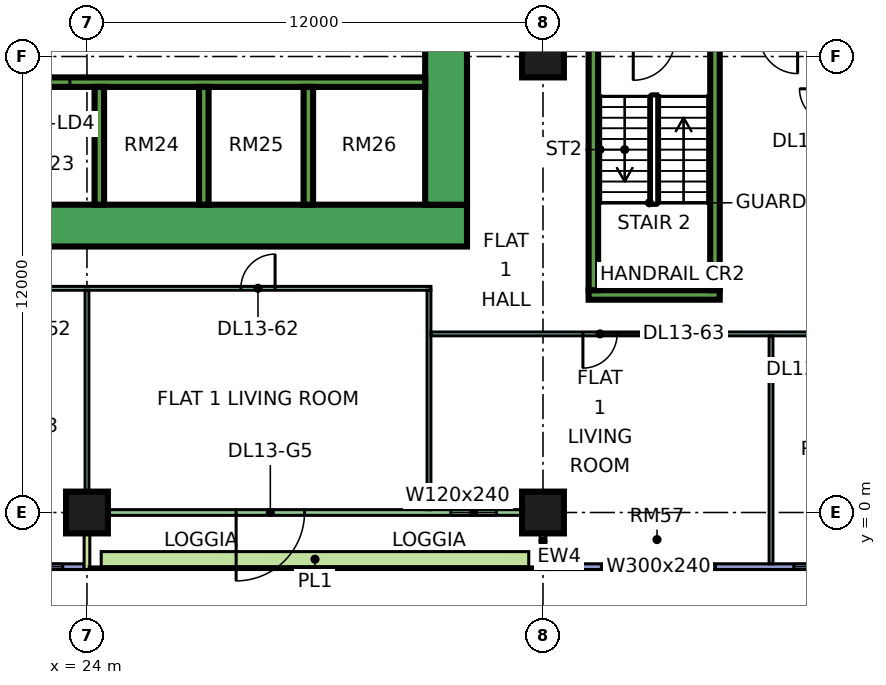
"""IFC4 building model, lengths in metres.
Left out: names, types, materials, properties, quantities, classifications, styles, units other than length and angle.
Written with IfcOpenShell. Run it as: python <this file> out.ifc"""

import sys

from ifc_helpers import new_model, si_unit, direction, frame, frame_2d, origin, origin_2d, place, context, subcontext, project, spatial, rectangle, extrude, element, fill, save


model = new_model("IFC4")
c1 = context("Model", 3, precision=1e-05, world=origin(), true_north=direction((0.0, 1.0)))
c2 = subcontext(c1, "Body", "Model", "MODEL_VIEW")
j1 = project(units=[si_unit("LENGTHUNIT", "METRE"), si_unit("PLANEANGLEUNIT", "RADIAN")], contexts=[c1])
p1 = place(None, origin())
s1 = spatial("IfcSite", under=j1, at=p1, CompositionType="ELEMENT")
p2 = place(p1, origin())
s2 = spatial("IfcBuilding", under=s1, at=p2, CompositionType="ELEMENT")
p3 = place(p2, frame((0.0, 0.0, 63.9)))
s3 = spatial("IfcBuildingStorey", under=s2, at=p3, CompositionType="ELEMENT", Elevation=63.9)
for number, where, z_axis, x_axis in (
    (1, (24.0, 0.0, 0.0), (0.0, 0.0, 1.0), (1.0, 0.0, 0.0)),
    (2, (36.0, 0.0, 0.0), (0.0, 0.0, 1.0), (1.0, 0.0, 0.0)),
    (3, (36.0, 12.0, 0.0), (0.0, 0.0, 1.0), (1.0, 0.0, 0.0)),
):
    element("IfcColumn", number, at=place(p3, frame(where, z_axis=z_axis, x_axis=x_axis)), inside=s3, PredefinedType="COLUMN", context=c2, shape_type="SweptSolid", body=[
        extrude(rectangle(XDim=1.1, YDim=1.1, at=origin_2d()), origin(), (0.0, 0.0, 1.0), 3.75),
    ])
p4 = place(p3, frame((9.0, 7.55, 0.0), z_axis=(0.0, 0.0, 1.0), x_axis=(1.0, 0.0, 0.0)))
e4 = element("IfcWall", 4, at=p4, inside=s3, PredefinedType="SHEAR", context=c2, shape_type="SweptSolid", body=[
    extrude(rectangle(XDim=25.0, YDim=1.1, at=frame_2d((12.5, 0.0))), origin(), (0.0, 0.0, 1.0), 3.75),
])
p5 = place(p3, frame((33.45, 8.1, 0.0), z_axis=(0.0, 0.0, 1.0), x_axis=(0.0, 1.0, 0.0)))
e5 = element("IfcWall", 5, at=p5, inside=s3, PredefinedType="SHEAR", context=c2, shape_type="SweptSolid", body=[
    extrude(rectangle(XDim=10.8, YDim=1.1, at=frame_2d((5.4, 0.0))), origin(), (0.0, 0.0, 1.0), 3.75),
])
p6 = place(p5, frame((5.1, 0.0, 0.0)))
e6 = element("IfcOpeningElement", 6, at=p6, cuts=e5, PredefinedType="OPENING", context=c2, shape_type="SweptSolid", body=[
    extrude(rectangle(XDim=1.8, YDim=2.4, at=frame_2d((0.9, 1.2))), frame((0.0, 0.56, 0.0), z_axis=(0.0, -1.0, 0.0), x_axis=(1.0, 0.0, 0.0)), (0.0, 0.0, 1.0), 1.12),
])
p7 = place(p3, frame((13.45, 11.325, 0.0), z_axis=(0.0, 0.0, 1.0), x_axis=(1.0, 0.0, 0.0)))
e7 = element("IfcWall", 7, at=p7, inside=s3, PredefinedType="SHEAR", context=c2, shape_type="SweptSolid", body=[
    extrude(rectangle(XDim=19.45, YDim=0.25, at=frame_2d((9.725, 0.0))), origin(), (0.0, 0.0, 1.0), 3.75),
])
p8 = place(p7, frame((0.65, 0.0, 0.0)))
e8 = element("IfcOpeningElement", 8, at=p8, cuts=e7, PredefinedType="OPENING", context=c2, shape_type="SweptSolid", body=[
    extrude(rectangle(XDim=1.2, YDim=2.2, at=frame_2d((0.6, 1.1))), frame((0.0, 0.135, 0.0), z_axis=(0.0, -1.0, 0.0), x_axis=(1.0, 0.0, 0.0)), (0.0, 0.0, 1.0), 0.27),
])
p9 = place(p7, frame((3.4, 0.0, 0.0)))
e9 = element("IfcOpeningElement", 9, at=p9, cuts=e7, PredefinedType="OPENING", context=c2, shape_type="SweptSolid", body=[
    extrude(rectangle(XDim=1.2, YDim=2.2, at=frame_2d((0.6, 1.1))), frame((0.0, 0.135, 0.0), z_axis=(0.0, -1.0, 0.0), x_axis=(1.0, 0.0, 0.0)), (0.0, 0.0, 1.0), 0.27),
])
p10 = place(p7, frame((6.15, 0.0, 0.0)))
e10 = element("IfcOpeningElement", 10, at=p10, cuts=e7, PredefinedType="OPENING", context=c2, shape_type="SweptSolid", body=[
    extrude(rectangle(XDim=1.2, YDim=2.2, at=frame_2d((0.6, 1.1))), frame((0.0, 0.135, 0.0), z_axis=(0.0, -1.0, 0.0), x_axis=(1.0, 0.0, 0.0)), (0.0, 0.0, 1.0), 0.27),
])
p11 = place(p7, frame((8.9, 0.0, 0.0)))
e11 = element("IfcOpeningElement", 11, at=p11, cuts=e7, PredefinedType="OPENING", context=c2, shape_type="SweptSolid", body=[
    extrude(rectangle(XDim=1.2, YDim=2.2, at=frame_2d((0.6, 1.1))), frame((0.0, 0.135, 0.0), z_axis=(0.0, -1.0, 0.0), x_axis=(1.0, 0.0, 0.0)), (0.0, 0.0, 1.0), 0.27),
])
for number, where, z_axis, x_axis in (
    (12, (24.325, 8.1, 0.0), (0.0, 0.0, 1.0), (0.0, 1.0, 0.0)),
    (13, (27.075, 8.1, 0.0), (0.0, 0.0, 1.0), (0.0, 1.0, 0.0)),
    (14, (29.825, 8.1, 0.0), (0.0, 0.0, 1.0), (0.0, 1.0, 0.0)),
):
    element("IfcWall", number, at=place(p3, frame(where, z_axis=z_axis, x_axis=x_axis)), inside=s3, PredefinedType="SHEAR", context=c2, shape_type="SweptSolid", body=[
        extrude(rectangle(XDim=3.1, YDim=0.25, at=frame_2d((1.55, 0.0))), origin(), (0.0, 0.0, 1.0), 3.75),
    ])
p12 = place(p3, frame((37.2, 5.725, 0.0), z_axis=(0.0, 0.0, 1.0), x_axis=(1.0, 0.0, 0.0)))
e15 = element("IfcWall", 15, at=p12, inside=s3, PredefinedType="SHEAR", context=c2, shape_type="SweptSolid", body=[
    extrude(rectangle(XDim=3.45, YDim=0.25, at=frame_2d((1.725, 0.0))), origin(), (0.0, 0.0, 1.0), 3.75),
])
for number, where, z_axis, x_axis in (
    (16, (37.325, 5.85, 0.0), (0.0, 0.0, 1.0), (0.0, 1.0, 0.0)),
    (17, (40.525, 5.85, 0.0), (0.0, 0.0, 1.0), (0.0, 1.0, 0.0)),
):
    element("IfcWall", number, at=place(p3, frame(where, z_axis=z_axis, x_axis=x_axis)), inside=s3, PredefinedType="SHEAR", context=c2, shape_type="SweptSolid", body=[
        extrude(rectangle(XDim=6.5, YDim=0.25, at=frame_2d((3.25, 0.0))), origin(), (0.0, 0.0, 1.0), 3.75),
    ])
p13 = place(p3, frame((12.5, -1.425, 0.0), z_axis=(0.0, 0.0, 1.0), x_axis=(1.0, 0.0, 0.0)))
e18 = element("IfcWall", 18, at=p13, inside=s3, PredefinedType="SOLIDWALL", context=c2, shape_type="SweptSolid", body=[
    extrude(rectangle(XDim=11.425, YDim=0.15, at=frame_2d((5.712, 0.0))), origin(), (0.0, 0.0, 1.0), 3.35),
])
p14 = place(p13, frame((0.35, 0.0, 0.45)))
e19 = element("IfcOpeningElement", 19, at=p14, cuts=e18, PredefinedType="OPENING", context=c2, shape_type="SweptSolid", body=[
    extrude(rectangle(XDim=1.8, YDim=2.4, at=frame_2d((0.9, 1.2))), frame((0.0, 0.085, 0.0), z_axis=(0.0, -1.0, 0.0), x_axis=(1.0, 0.0, 0.0)), (0.0, 0.0, 1.0), 0.17),
])
p15 = place(p13, frame((3.1, 0.0, 0.45)))
e20 = element("IfcOpeningElement", 20, at=p15, cuts=e18, PredefinedType="OPENING", context=c2, shape_type="SweptSolid", body=[
    extrude(rectangle(XDim=1.8, YDim=2.4, at=frame_2d((0.9, 1.2))), frame((0.0, 0.085, 0.0), z_axis=(0.0, -1.0, 0.0), x_axis=(1.0, 0.0, 0.0)), (0.0, 0.0, 1.0), 0.17),
])
p16 = place(p13, frame((6.1, 0.0, 0.45)))
e21 = element("IfcOpeningElement", 21, at=p16, cuts=e18, PredefinedType="OPENING", context=c2, shape_type="SweptSolid", body=[
    extrude(rectangle(XDim=1.8, YDim=2.4, at=frame_2d((0.9, 1.2))), frame((0.0, 0.085, 0.0), z_axis=(0.0, -1.0, 0.0), x_axis=(1.0, 0.0, 0.0)), (0.0, 0.0, 1.0), 0.17),
])
p17 = place(p13, frame((9.062, 0.0, 0.45)))
e22 = element("IfcOpeningElement", 22, at=p17, cuts=e18, PredefinedType="OPENING", context=c2, shape_type="SweptSolid", body=[
    extrude(rectangle(XDim=1.8, YDim=2.4, at=frame_2d((0.9, 1.2))), frame((0.0, 0.085, 0.0), z_axis=(0.0, -1.0, 0.0), x_axis=(1.0, 0.0, 0.0)), (0.0, 0.0, 1.0), 0.17),
])
p18 = place(p3, frame((24.075, 0.0, 0.0), z_axis=(0.0, 0.0, 1.0), x_axis=(1.0, 0.0, 0.0)))
e23 = element("IfcWall", 23, at=p18, inside=s3, PredefinedType="SOLIDWALL", context=c2, shape_type="SweptSolid", body=[
    extrude(rectangle(XDim=11.85, YDim=0.15, at=frame_2d((5.925, 0.0))), origin(), (0.0, 0.0, 1.0), 3.35),
])
p19 = place(p18, frame((3.85, 0.0, 0.0)))
e24 = element("IfcOpeningElement", 24, at=p19, cuts=e23, PredefinedType="OPENING", context=c2, shape_type="SweptSolid", body=[
    extrude(rectangle(XDim=1.8, YDim=2.4, at=frame_2d((0.9, 1.2))), frame((0.0, 0.085, 0.0), z_axis=(0.0, -1.0, 0.0), x_axis=(1.0, 0.0, 0.0)), (0.0, 0.0, 1.0), 0.17),
])
p20 = place(p18, frame((9.5, 0.0, 0.45)))
e25 = element("IfcOpeningElement", 25, at=p20, cuts=e23, PredefinedType="OPENING", context=c2, shape_type="SweptSolid", body=[
    extrude(rectangle(XDim=1.2, YDim=2.4, at=frame_2d((0.6, 1.2))), frame((0.0, 0.085, 0.0), z_axis=(0.0, -1.0, 0.0), x_axis=(1.0, 0.0, 0.0)), (0.0, 0.0, 1.0), 0.17),
])
for number, where, z_axis, x_axis in (
    (26, (24.0, -1.5, 0.0), (0.0, 0.0, 1.0), (0.0, 1.0, 0.0)),
    (27, (36.0, -1.5, 0.0), (0.0, 0.0, 1.0), (0.0, 1.0, 0.0)),
):
    element("IfcWall", number, at=place(p3, frame(where, z_axis=z_axis, x_axis=x_axis)), inside=s3, PredefinedType="SOLIDWALL", context=c2, shape_type="SweptSolid", body=[
        extrude(rectangle(XDim=1.5, YDim=0.15, at=frame_2d((0.75, 0.0))), origin(), (0.0, 0.0, 1.0), 3.35),
    ])
p21 = place(p3, frame((36.075, -1.425, 0.0), z_axis=(0.0, 0.0, 1.0), x_axis=(1.0, 0.0, 0.0)))
e28 = element("IfcWall", 28, at=p21, inside=s3, PredefinedType="SOLIDWALL", context=c2, shape_type="SweptSolid", body=[
    extrude(rectangle(XDim=11.85, YDim=0.15, at=frame_2d((5.925, 0.0))), origin(), (0.0, 0.0, 1.0), 3.35),
])
p22 = place(p21, frame((1.462, 0.0, 0.45)))
e29 = element("IfcOpeningElement", 29, at=p22, cuts=e28, PredefinedType="OPENING", context=c2, shape_type="SweptSolid", body=[
    extrude(rectangle(XDim=3.0, YDim=2.4, at=frame_2d((1.5, 1.2))), frame((0.0, 0.085, 0.0), z_axis=(0.0, -1.0, 0.0), x_axis=(1.0, 0.0, 0.0)), (0.0, 0.0, 1.0), 0.17),
])
p23 = place(p21, frame((6.525, 0.0, 0.45)))
e30 = element("IfcOpeningElement", 30, at=p23, cuts=e28, PredefinedType="OPENING", context=c2, shape_type="SweptSolid", body=[
    extrude(rectangle(XDim=1.8, YDim=2.4, at=frame_2d((0.9, 1.2))), frame((0.0, 0.085, 0.0), z_axis=(0.0, -1.0, 0.0), x_axis=(1.0, 0.0, 0.0)), (0.0, 0.0, 1.0), 0.17),
])
p24 = place(p21, frame((9.488, 0.0, 0.45)))
e31 = element("IfcOpeningElement", 31, at=p24, cuts=e28, PredefinedType="OPENING", context=c2, shape_type="SweptSolid", body=[
    extrude(rectangle(XDim=1.8, YDim=2.4, at=frame_2d((0.9, 1.2))), frame((0.0, 0.085, 0.0), z_axis=(0.0, -1.0, 0.0), x_axis=(1.0, 0.0, 0.0)), (0.0, 0.0, 1.0), 0.17),
])
p25 = place(p3, frame((24.375, -1.229, 0.0), z_axis=(0.0, 0.0, 1.0), x_axis=(1.0, 0.0, 0.0)))
e32 = element("IfcWall", 32, at=p25, inside=s3, PredefinedType="SOLIDWALL", context=c2, shape_type="SweptSolid", body=[
    extrude(rectangle(XDim=11.25, YDim=0.4, at=frame_2d((5.625, 0.0))), origin(), (0.0, 0.0, 1.0), 0.7),
])
p26 = place(p3, frame((11.95, 5.9, 0.0), z_axis=(0.0, 0.0, 1.0), x_axis=(1.0, 0.0, 0.0)))
e33 = element("IfcWall", 33, at=p26, inside=s3, PredefinedType="PARTITIONING", context=c2, shape_type="SweptSolid", body=[
    extrude(rectangle(XDim=21.1, YDim=0.1, at=frame_2d((10.55, 0.0))), origin(), (0.0, 0.0, 1.0), 3.35),
])
p27 = place(p26, frame((1.1, 0.0, 0.0)))
e34 = element("IfcOpeningElement", 34, at=p27, cuts=e33, PredefinedType="OPENING", context=c2, shape_type="SweptSolid", body=[
    extrude(rectangle(XDim=0.9, YDim=2.1, at=frame_2d((0.45, 1.05))), frame((0.0, 0.06, 0.0), z_axis=(0.0, -1.0, 0.0), x_axis=(1.0, 0.0, 0.0)), (0.0, 0.0, 1.0), 0.12),
])
p28 = place(p26, frame((4.1, 0.0, 0.0)))
e35 = element("IfcOpeningElement", 35, at=p28, cuts=e33, PredefinedType="OPENING", context=c2, shape_type="SweptSolid", body=[
    extrude(rectangle(XDim=0.9, YDim=2.1, at=frame_2d((0.45, 1.05))), frame((0.0, 0.06, 0.0), z_axis=(0.0, -1.0, 0.0), x_axis=(1.0, 0.0, 0.0)), (0.0, 0.0, 1.0), 0.12),
])
p29 = place(p26, frame((7.1, 0.0, 0.0)))
e36 = element("IfcOpeningElement", 36, at=p29, cuts=e33, PredefinedType="OPENING", context=c2, shape_type="SweptSolid", body=[
    extrude(rectangle(XDim=0.9, YDim=2.1, at=frame_2d((0.45, 1.05))), frame((0.0, 0.06, 0.0), z_axis=(0.0, -1.0, 0.0), x_axis=(1.0, 0.0, 0.0)), (0.0, 0.0, 1.0), 0.12),
])
p30 = place(p26, frame((10.1, 0.0, 0.0)))
e37 = element("IfcOpeningElement", 37, at=p30, cuts=e33, PredefinedType="OPENING", context=c2, shape_type="SweptSolid", body=[
    extrude(rectangle(XDim=0.9, YDim=2.1, at=frame_2d((0.45, 1.05))), frame((0.0, 0.06, 0.0), z_axis=(0.0, -1.0, 0.0), x_axis=(1.0, 0.0, 0.0)), (0.0, 0.0, 1.0), 0.12),
])
p31 = place(p26, frame((16.1, 0.0, 0.0)))
e38 = element("IfcOpeningElement", 38, at=p31, cuts=e33, PredefinedType="OPENING", context=c2, shape_type="SweptSolid", body=[
    extrude(rectangle(XDim=0.9, YDim=2.1, at=frame_2d((0.45, 1.05))), frame((0.0, 0.06, 0.0), z_axis=(0.0, -1.0, 0.0), x_axis=(1.0, 0.0, 0.0)), (0.0, 0.0, 1.0), 0.12),
])
p32 = place(p3, frame((24.0, 0.0, 0.0), z_axis=(0.0, 0.0, 1.0), x_axis=(0.0, 1.0, 0.0)))
e39 = element("IfcWall", 39, at=p32, inside=s3, PredefinedType="PARTITIONING", context=c2, shape_type="SweptSolid", body=[
    extrude(rectangle(XDim=5.85, YDim=0.1, at=frame_2d((2.925, 0.0))), origin(), (0.0, 0.0, 1.0), 3.35),
])
p33 = place(p3, frame((33.0, 0.074, 0.0), z_axis=(0.0, 0.0, 1.0), x_axis=(0.0, 1.0, 0.0)))
e40 = element("IfcWall", 40, at=p33, inside=s3, PredefinedType="PARTITIONING", context=c2, shape_type="SweptSolid", body=[
    extrude(rectangle(XDim=5.776, YDim=0.1, at=frame_2d((2.888, 0.0))), origin(), (0.0, 0.0, 1.0), 3.35),
])
p34 = place(p3, frame((33.05, 4.7, 0.0), z_axis=(0.0, 0.0, 1.0), x_axis=(1.0, 0.0, 0.0)))
e41 = element("IfcWall", 41, at=p34, inside=s3, PredefinedType="PARTITIONING", context=c2, shape_type="SweptSolid", body=[
    extrude(rectangle(XDim=20.85, YDim=0.1, at=frame_2d((10.425, 0.0))), origin(), (0.0, 0.0, 1.0), 3.35),
])
p35 = place(p34, frame((10.0, 0.0, 0.0)))
e42 = element("IfcOpeningElement", 42, at=p35, cuts=e41, PredefinedType="OPENING", context=c2, shape_type="SweptSolid", body=[
    extrude(rectangle(XDim=0.9, YDim=2.1, at=frame_2d((0.45, 1.05))), frame((0.0, 0.06, 0.0), z_axis=(0.0, -1.0, 0.0), x_axis=(1.0, 0.0, 0.0)), (0.0, 0.0, 1.0), 0.12),
])
p36 = place(p34, frame((13.0, 0.0, 0.0)))
e43 = element("IfcOpeningElement", 43, at=p36, cuts=e41, PredefinedType="OPENING", context=c2, shape_type="SweptSolid", body=[
    extrude(rectangle(XDim=0.9, YDim=2.1, at=frame_2d((0.45, 1.05))), frame((0.0, 0.06, 0.0), z_axis=(0.0, -1.0, 0.0), x_axis=(1.0, 0.0, 0.0)), (0.0, 0.0, 1.0), 0.12),
])
p37 = place(p34, frame((16.0, 0.0, 0.0)))
e44 = element("IfcOpeningElement", 44, at=p37, cuts=e41, PredefinedType="OPENING", context=c2, shape_type="SweptSolid", body=[
    extrude(rectangle(XDim=0.9, YDim=2.1, at=frame_2d((0.45, 1.05))), frame((0.0, 0.06, 0.0), z_axis=(0.0, -1.0, 0.0), x_axis=(1.0, 0.0, 0.0)), (0.0, 0.0, 1.0), 0.12),
])
p38 = place(p34, frame((19.0, 0.0, 0.0)))
e45 = element("IfcOpeningElement", 45, at=p38, cuts=e41, PredefinedType="OPENING", context=c2, shape_type="SweptSolid", body=[
    extrude(rectangle(XDim=0.9, YDim=2.1, at=frame_2d((0.45, 1.05))), frame((0.0, 0.06, 0.0), z_axis=(0.0, -1.0, 0.0), x_axis=(1.0, 0.0, 0.0)), (0.0, 0.0, 1.0), 0.12),
])
p39 = place(p34, frame((4.0, 0.0, 0.0)))
e46 = element("IfcOpeningElement", 46, at=p39, cuts=e41, PredefinedType="OPENING", context=c2, shape_type="SweptSolid", body=[
    extrude(rectangle(XDim=0.9, YDim=2.1, at=frame_2d((0.45, 1.05))), frame((0.0, 0.06, 0.0), z_axis=(0.0, -1.0, 0.0), x_axis=(1.0, 0.0, 0.0)), (0.0, 0.0, 1.0), 0.12),
])
p40 = place(p3, frame((42.0, -1.35, 0.0), z_axis=(0.0, 0.0, 1.0), x_axis=(0.0, 1.0, 0.0)))
e47 = element("IfcWall", 47, at=p40, inside=s3, PredefinedType="PARTITIONING", context=c2, shape_type="SweptSolid", body=[
    extrude(rectangle(XDim=6.0, YDim=0.1, at=frame_2d((3.0, 0.0))), origin(), (0.0, 0.0, 1.0), 3.35),
])
p41 = place(p17, origin())
e48 = element("IfcWindow", 48, at=p41, inside=s3, PartitioningType="SINGLE_PANEL", PredefinedType="WINDOW", context=c2, shape_type="SweptSolid", body=[
    extrude(rectangle(XDim=1.8, YDim=2.4, at=frame_2d((0.9, 1.2))), frame((0.0, 0.03, 0.0), z_axis=(0.0, -1.0, 0.0), x_axis=(1.0, 0.0, 0.0)), (0.0, 0.0, 1.0), 0.06),
])
fill(e22, e48)
p42 = place(p19, frame((1.8, 0.0, 0.0), z_axis=(0.0, 0.0, 1.0), x_axis=(-1.0, 0.0, 0.0)))
e49 = element("IfcDoor", 49, at=p42, inside=s3, OperationType="DOUBLE_DOOR_SINGLE_SWING", PredefinedType="DOOR", context=c2, shape_type="SweptSolid", body=[
    extrude(rectangle(XDim=1.8, YDim=2.4, at=frame_2d((0.9, 1.2))), frame((0.0, 0.025, 0.0), z_axis=(0.0, -1.0, 0.0), x_axis=(1.0, 0.0, 0.0)), (0.0, 0.0, 1.0), 0.05),
])
fill(e24, e49)
p43 = place(p20, origin())
e50 = element("IfcWindow", 50, at=p43, inside=s3, PartitioningType="SINGLE_PANEL", PredefinedType="WINDOW", context=c2, shape_type="SweptSolid", body=[
    extrude(rectangle(XDim=1.2, YDim=2.4, at=frame_2d((0.6, 1.2))), frame((0.0, 0.03, 0.0), z_axis=(0.0, -1.0, 0.0), x_axis=(1.0, 0.0, 0.0)), (0.0, 0.0, 1.0), 0.06),
])
fill(e25, e50)
p44 = place(p22, origin())
e51 = element("IfcWindow", 51, at=p44, inside=s3, PartitioningType="SINGLE_PANEL", PredefinedType="WINDOW", context=c2, shape_type="SweptSolid", body=[
    extrude(rectangle(XDim=3.0, YDim=2.4, at=frame_2d((1.5, 1.2))), frame((0.0, 0.03, 0.0), z_axis=(0.0, -1.0, 0.0), x_axis=(1.0, 0.0, 0.0)), (0.0, 0.0, 1.0), 0.06),
])
fill(e29, e51)
p45 = place(p23, origin())
e52 = element("IfcWindow", 52, at=p45, inside=s3, PartitioningType="SINGLE_PANEL", PredefinedType="WINDOW", context=c2, shape_type="SweptSolid", body=[
    extrude(rectangle(XDim=1.8, YDim=2.4, at=frame_2d((0.9, 1.2))), frame((0.0, 0.03, 0.0), z_axis=(0.0, -1.0, 0.0), x_axis=(1.0, 0.0, 0.0)), (0.0, 0.0, 1.0), 0.06),
])
fill(e30, e52)
p46 = place(p11, origin())
e53 = element("IfcDoor", 53, at=p46, inside=s3, OperationType="DOUBLE_DOOR_SLIDING", PredefinedType="DOOR", context=c2, shape_type="SweptSolid", body=[
    extrude(rectangle(XDim=1.2, YDim=2.2, at=frame_2d((0.6, 1.1))), frame((0.0, 0.025, 0.0), z_axis=(0.0, -1.0, 0.0), x_axis=(1.0, 0.0, 0.0)), (0.0, 0.0, 1.0), 0.05),
])
fill(e11, e53)
p47 = place(p31, frame((0.9, 0.0, 0.0), z_axis=(0.0, 0.0, 1.0), x_axis=(-1.0, 0.0, 0.0)))
e54 = element("IfcDoor", 54, at=p47, inside=s3, OperationType="SINGLE_SWING_RIGHT", PredefinedType="DOOR", context=c2, shape_type="SweptSolid", body=[
    extrude(rectangle(XDim=0.9, YDim=2.1, at=frame_2d((0.45, 1.05))), frame((0.0, 0.025, 0.0), z_axis=(0.0, -1.0, 0.0), x_axis=(1.0, 0.0, 0.0)), (0.0, 0.0, 1.0), 0.05),
])
fill(e38, e54)
p48 = place(p39, frame((0.9, 0.0, 0.0), z_axis=(0.0, 0.0, 1.0), x_axis=(-1.0, 0.0, 0.0)))
e55 = element("IfcDoor", 55, at=p48, inside=s3, OperationType="SINGLE_SWING_LEFT", PredefinedType="DOOR", context=c2, shape_type="SweptSolid", body=[
    extrude(rectangle(XDim=0.9, YDim=2.1, at=frame_2d((0.45, 1.05))), frame((0.0, 0.025, 0.0), z_axis=(0.0, -1.0, 0.0), x_axis=(1.0, 0.0, 0.0)), (0.0, 0.0, 1.0), 0.05),
])
fill(e46, e55)
save(model, sys.argv[1])
